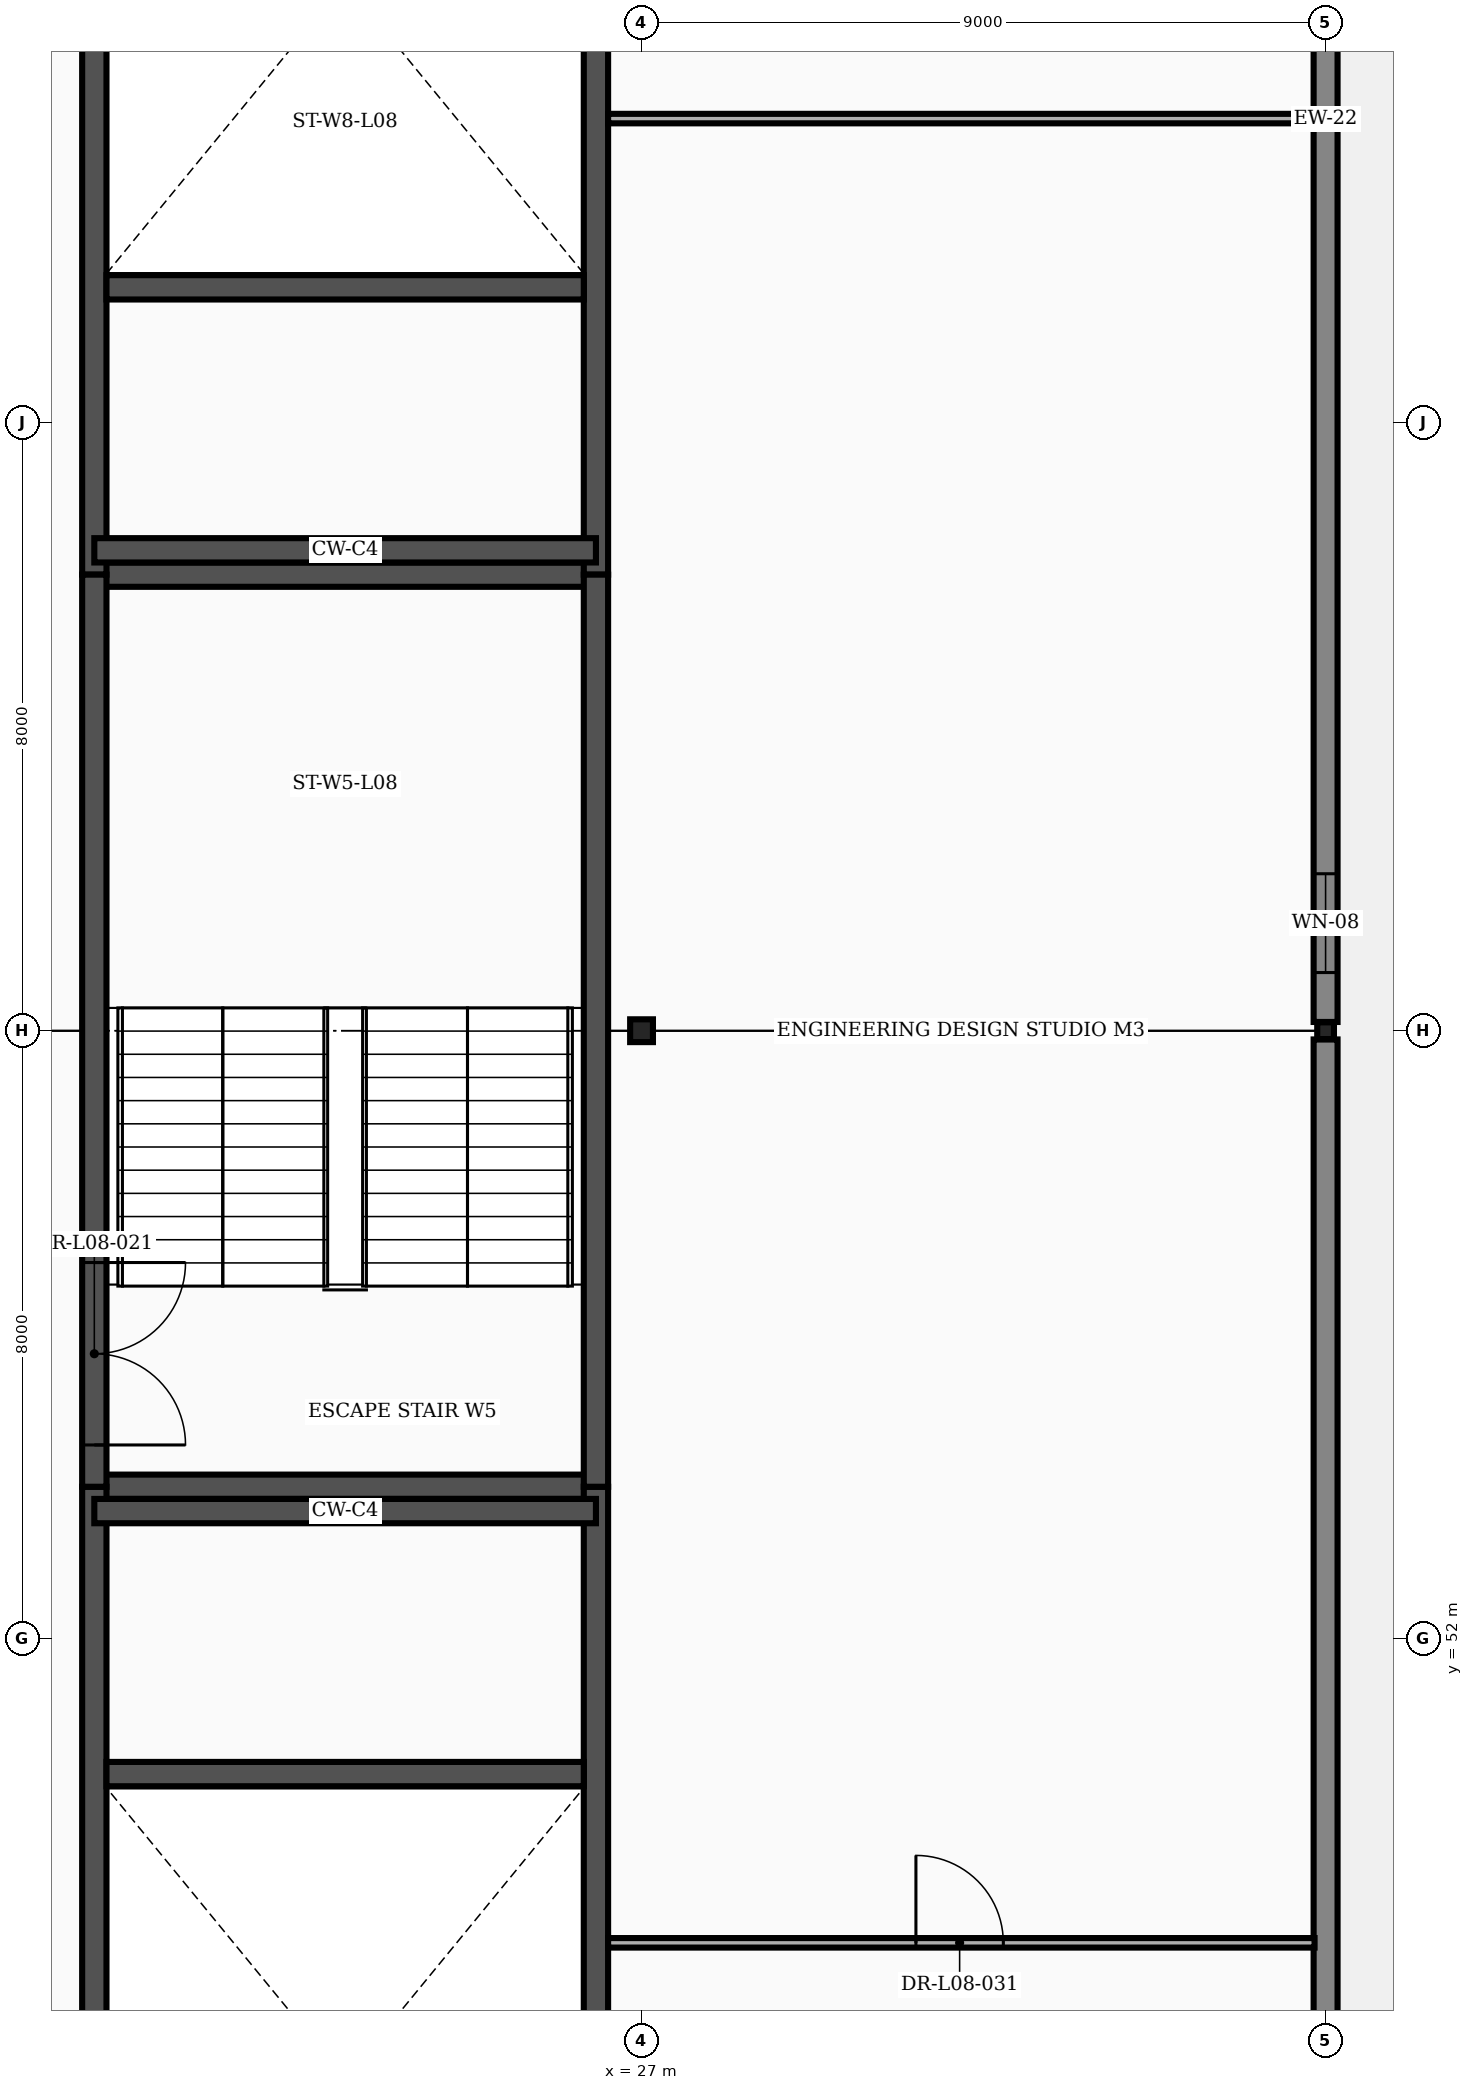
"""IFC4 building model, lengths in metres.
Left out: names, types, materials, properties, quantities, classifications, styles, units other than length and angle.
Written with IfcOpenShell. Run it as: python <this file> out.ifc"""

import sys

from ifc_helpers import new_model, si_unit, direction, frame, frame_2d, origin, origin_2d, place, context, subcontext, project, spatial, rectangle, hollow_rectangle, extrude, element, fill, save


model = new_model("IFC4")
c1 = context("Model", 3, precision=1e-05, world=origin(), true_north=direction((0.0, 1.0)))
c2 = subcontext(c1, "Body", "Model", "MODEL_VIEW")
j1 = project(units=[si_unit("LENGTHUNIT", "METRE"), si_unit("PLANEANGLEUNIT", "RADIAN")], contexts=[c1])
p1 = place(None, origin())
s1 = spatial("IfcSite", under=j1, at=p1, CompositionType="ELEMENT")
p2 = place(p1, origin())
s2 = spatial("IfcBuilding", under=s1, at=p2, CompositionType="ELEMENT")
p3 = place(p2, frame((0.0, 0.0, 37.8)))
s3 = spatial("IfcBuildingStorey", under=s2, at=p3, CompositionType="ELEMENT", Elevation=37.8)
p4 = place(p3, frame((27.0, 60.0, 0.0), z_axis=(0.0, 0.0, 1.0), x_axis=(1.0, 0.0, 0.0)))
e1 = element("IfcColumn", 1, at=p4, inside=s3, PredefinedType="COLUMN", context=c2, shape_type="SweptSolid", body=[
    extrude(hollow_rectangle(XDim=0.3, YDim=0.3, WallThickness=0.012, at=origin_2d()), origin(), (0.0, 0.0, 1.0), 3.9),
])
p5 = place(p3, frame((36.0, 60.0, 0.0), z_axis=(0.0, 0.0, 1.0), x_axis=(1.0, 0.0, 0.0)))
e2 = element("IfcColumn", 2, at=p5, inside=s3, PredefinedType="COLUMN", context=c2, shape_type="SweptSolid", body=[
    extrude(hollow_rectangle(XDim=0.22, YDim=0.22, WallThickness=0.01, at=origin_2d()), origin(), (0.0, 0.0, 1.0), 3.9),
])
p6 = place(p3, frame((36.0, 36.115, 0.0), z_axis=(0.0, 0.0, 1.0), x_axis=(0.0, 1.0, 0.0)))
e3 = element("IfcWall", 3, at=p6, inside=s3, PredefinedType="STANDARD", context=c2, shape_type="SweptSolid", body=[
    extrude(rectangle(XDim=23.77, YDim=0.315, at=frame_2d((11.885, 0.0))), origin(), (0.0, 0.0, 1.0), 2.953),
])
p7 = place(p6, frame((0.65, 0.0, 0.7)))
e4 = element("IfcOpeningElement", 4, at=p7, cuts=e3, PredefinedType="OPENING", context=c2, shape_type="SweptSolid", body=[
    extrude(rectangle(XDim=1.3, YDim=1.9, at=frame_2d((0.65, 0.95))), frame((0.0, 0.169, 0.0), z_axis=(0.0, -1.0, 0.0), x_axis=(1.0, 0.0, 0.0)), (0.0, 0.0, 1.0), 0.339),
])
p8 = place(p3, frame((36.0, 60.115, 0.0), z_axis=(0.0, 0.0, 1.0), x_axis=(0.0, 1.0, 0.0)))
e5 = element("IfcWall", 5, at=p8, inside=s3, PredefinedType="STANDARD", context=c2, shape_type="SweptSolid", body=[
    extrude(rectangle(XDim=23.77, YDim=0.315, at=frame_2d((11.885, 0.0))), origin(), (0.0, 0.0, 1.0), 2.953),
])
p9 = place(p8, frame((0.65, 0.0, 0.7)))
e6 = element("IfcOpeningElement", 6, at=p9, cuts=e5, PredefinedType="OPENING", context=c2, shape_type="SweptSolid", body=[
    extrude(rectangle(XDim=1.3, YDim=1.9, at=frame_2d((0.65, 0.95))), frame((0.0, 0.169, 0.0), z_axis=(0.0, -1.0, 0.0), x_axis=(1.0, 0.0, 0.0)), (0.0, 0.0, 1.0), 0.339),
])
p10 = place(p3, frame((19.8, 54.0, 0.0), z_axis=(0.0, 0.0, 1.0), x_axis=(1.0, 0.0, 0.0)))
e7 = element("IfcWall", 7, at=p10, inside=s3, PredefinedType="SHEAR", context=c2, shape_type="SweptSolid", body=[
    extrude(rectangle(XDim=6.6, YDim=0.32, at=frame_2d((3.3, 0.0))), origin(), (0.0, 0.0, 1.0), 3.565),
])
p11 = place(p3, frame((19.8, 39.4, 0.0), z_axis=(0.0, 0.0, 1.0), x_axis=(0.0, 1.0, 0.0)))
e8 = element("IfcWall", 8, at=p11, inside=s3, PredefinedType="SHEAR", context=c2, shape_type="SweptSolid", body=[
    extrude(rectangle(XDim=14.6, YDim=0.32, at=frame_2d((7.3, 0.0))), origin(), (0.0, 0.0, 1.0), 3.565),
])
p12 = place(p11, frame((0.55, 0.0, 0.0)))
e9 = element("IfcOpeningElement", 9, at=p12, cuts=e8, PredefinedType="OPENING", context=c2, shape_type="SweptSolid", body=[
    extrude(rectangle(XDim=2.4, YDim=2.25, at=frame_2d((1.2, 1.125))), frame((0.0, 0.172, 0.0), z_axis=(0.0, -1.0, 0.0), x_axis=(1.0, 0.0, 0.0)), (0.0, 0.0, 1.0), 0.344),
])
p13 = place(p3, frame((26.4, 39.4, 0.0), z_axis=(0.0, 0.0, 1.0), x_axis=(0.0, 1.0, 0.0)))
e10 = element("IfcWall", 10, at=p13, inside=s3, PredefinedType="SHEAR", context=c2, shape_type="SweptSolid", body=[
    extrude(rectangle(XDim=14.6, YDim=0.32, at=frame_2d((7.3, 0.0))), origin(), (0.0, 0.0, 1.0), 3.565),
])
p14 = place(p3, frame((19.96, 50.22, 0.0), z_axis=(0.0, 0.0, 1.0), x_axis=(1.0, 0.0, 0.0)))
e11 = element("IfcWall", 11, at=p14, inside=s3, PredefinedType="SHEAR", context=c2, shape_type="SweptSolid", body=[
    extrude(rectangle(XDim=6.28, YDim=0.32, at=frame_2d((3.14, 0.0))), origin(), (0.0, 0.0, 1.0), 3.565),
])
p15 = place(p3, frame((19.8, 66.0, 0.0), z_axis=(0.0, 0.0, 1.0), x_axis=(1.0, 0.0, 0.0)))
e12 = element("IfcWall", 12, at=p15, inside=s3, PredefinedType="SHEAR", context=c2, shape_type="SweptSolid", body=[
    extrude(rectangle(XDim=6.6, YDim=0.32, at=frame_2d((3.3, 0.0))), origin(), (0.0, 0.0, 1.0), 3.565),
])
p16 = place(p3, frame((19.8, 66.0, 0.0), z_axis=(0.0, 0.0, 1.0), x_axis=(0.0, 1.0, 0.0)))
e13 = element("IfcWall", 13, at=p16, inside=s3, PredefinedType="SHEAR", context=c2, shape_type="SweptSolid", body=[
    extrude(rectangle(XDim=14.6, YDim=0.32, at=frame_2d((7.3, 0.0))), origin(), (0.0, 0.0, 1.0), 3.565),
])
p17 = place(p16, frame((11.65, 0.0, 0.0)))
e14 = element("IfcOpeningElement", 14, at=p17, cuts=e13, PredefinedType="OPENING", context=c2, shape_type="SweptSolid", body=[
    extrude(rectangle(XDim=2.4, YDim=2.25, at=frame_2d((1.2, 1.125))), frame((0.0, 0.172, 0.0), z_axis=(0.0, -1.0, 0.0), x_axis=(1.0, 0.0, 0.0)), (0.0, 0.0, 1.0), 0.344),
])
p18 = place(p3, frame((26.4, 66.0, 0.0), z_axis=(0.0, 0.0, 1.0), x_axis=(0.0, 1.0, 0.0)))
e15 = element("IfcWall", 15, at=p18, inside=s3, PredefinedType="SHEAR", context=c2, shape_type="SweptSolid", body=[
    extrude(rectangle(XDim=14.6, YDim=0.32, at=frame_2d((7.3, 0.0))), origin(), (0.0, 0.0, 1.0), 3.565),
])
p19 = place(p3, frame((19.96, 69.78, 0.0), z_axis=(0.0, 0.0, 1.0), x_axis=(1.0, 0.0, 0.0)))
e16 = element("IfcWall", 16, at=p19, inside=s3, PredefinedType="SHEAR", context=c2, shape_type="SweptSolid", body=[
    extrude(rectangle(XDim=6.28, YDim=0.32, at=frame_2d((3.14, 0.0))), origin(), (0.0, 0.0, 1.0), 3.565),
])
for number, where, z_axis, x_axis in (
    (17, (19.8, 53.68, 0.0), (0.0, 0.0, 1.0), (1.0, 0.0, 0.0)),
    (18, (19.8, 66.32, 0.0), (0.0, 0.0, 1.0), (1.0, 0.0, 0.0)),
):
    element("IfcWall", number, at=place(p3, frame(where, z_axis=z_axis, x_axis=x_axis)), inside=s3, PredefinedType="SHEAR", context=c2, shape_type="SweptSolid", body=[
        extrude(rectangle(XDim=6.6, YDim=0.32, at=frame_2d((3.3, 0.0))), origin(), (0.0, 0.0, 1.0), 3.565),
    ])
p20 = place(p3, frame((19.8, 54.0, 0.0), z_axis=(0.0, 0.0, 1.0), x_axis=(0.0, 1.0, 0.0)))
e19 = element("IfcWall", 19, at=p20, inside=s3, PredefinedType="SHEAR", context=c2, shape_type="SweptSolid", body=[
    extrude(rectangle(XDim=12.0, YDim=0.32, at=frame_2d((6.0, 0.0))), origin(), (0.0, 0.0, 1.0), 3.565),
])
p21 = place(p20, frame((0.55, 0.0, 0.0)))
e20 = element("IfcOpeningElement", 20, at=p21, cuts=e19, PredefinedType="OPENING", context=c2, shape_type="SweptSolid", body=[
    extrude(rectangle(XDim=2.4, YDim=2.25, at=frame_2d((1.2, 1.125))), frame((0.0, 0.172, 0.0), z_axis=(0.0, -1.0, 0.0), x_axis=(1.0, 0.0, 0.0)), (0.0, 0.0, 1.0), 0.344),
])
p22 = place(p3, frame((26.4, 54.0, 0.0), z_axis=(0.0, 0.0, 1.0), x_axis=(0.0, 1.0, 0.0)))
e21 = element("IfcWall", 21, at=p22, inside=s3, PredefinedType="SHEAR", context=c2, shape_type="SweptSolid", body=[
    extrude(rectangle(XDim=12.0, YDim=0.32, at=frame_2d((6.0, 0.0))), origin(), (0.0, 0.0, 1.0), 3.565),
])
p23 = place(p3, frame((26.56, 48.0, 0.0), z_axis=(0.0, 0.0, 1.0), x_axis=(1.0, 0.0, 0.0)))
e22 = element("IfcWall", 22, at=p23, inside=s3, PredefinedType="PARTITIONING", context=c2, shape_type="SweptSolid", body=[
    extrude(rectangle(XDim=9.295, YDim=0.125, at=frame_2d((4.647, 0.0))), origin(), (0.0, 0.0, 1.0), 3.565),
])
p24 = place(p23, frame((4.05, 0.0, 0.0)))
e23 = element("IfcOpeningElement", 23, at=p24, cuts=e22, PredefinedType="OPENING", context=c2, shape_type="SweptSolid", body=[
    extrude(rectangle(XDim=1.15, YDim=2.15, at=frame_2d((0.575, 1.075))), frame((0.0, 0.074, 0.0), z_axis=(0.0, -1.0, 0.0), x_axis=(1.0, 0.0, 0.0)), (0.0, 0.0, 1.0), 0.149),
])
p25 = place(p3, frame((26.56, 72.0, 0.0), z_axis=(0.0, 0.0, 1.0), x_axis=(1.0, 0.0, 0.0)))
e24 = element("IfcWall", 24, at=p25, inside=s3, PredefinedType="PARTITIONING", context=c2, shape_type="SweptSolid", body=[
    extrude(rectangle(XDim=9.295, YDim=0.125, at=frame_2d((4.647, 0.0))), origin(), (0.0, 0.0, 1.0), 3.565),
])
p26 = place(p9, origin())
e25 = element("IfcWindow", 25, at=p26, inside=s3, PartitioningType="SINGLE_PANEL", PredefinedType="WINDOW", context=c2, shape_type="SweptSolid", body=[
    extrude(rectangle(XDim=1.3, YDim=1.9, at=frame_2d((0.65, 0.95))), frame((0.0, 0.03, 0.0), z_axis=(0.0, -1.0, 0.0), x_axis=(1.0, 0.0, 0.0)), (0.0, 0.0, 1.0), 0.06),
])
fill(e6, e25)
p27 = place(p21, frame((2.4, 0.0, 0.0), z_axis=(0.0, 0.0, 1.0), x_axis=(-1.0, 0.0, 0.0)))
e26 = element("IfcDoor", 26, at=p27, inside=s3, OperationType="DOUBLE_DOOR_SINGLE_SWING", PredefinedType="DOOR", context=c2, shape_type="SweptSolid", body=[
    extrude(rectangle(XDim=2.4, YDim=2.25, at=frame_2d((1.2, 1.125))), frame((0.0, 0.025, 0.0), z_axis=(0.0, -1.0, 0.0), x_axis=(1.0, 0.0, 0.0)), (0.0, 0.0, 1.0), 0.05),
])
fill(e20, e26)
p28 = place(p24, origin())
e27 = element("IfcDoor", 27, at=p28, inside=s3, OperationType="SINGLE_SWING_LEFT", PredefinedType="DOOR", context=c2, shape_type="SweptSolid", body=[
    extrude(rectangle(XDim=1.15, YDim=2.15, at=frame_2d((0.575, 1.075))), frame((0.0, 0.025, 0.0), z_axis=(0.0, -1.0, 0.0), x_axis=(1.0, 0.0, 0.0)), (0.0, 0.0, 1.0), 0.05),
])
fill(e23, e27)
save(model, sys.argv[1])
